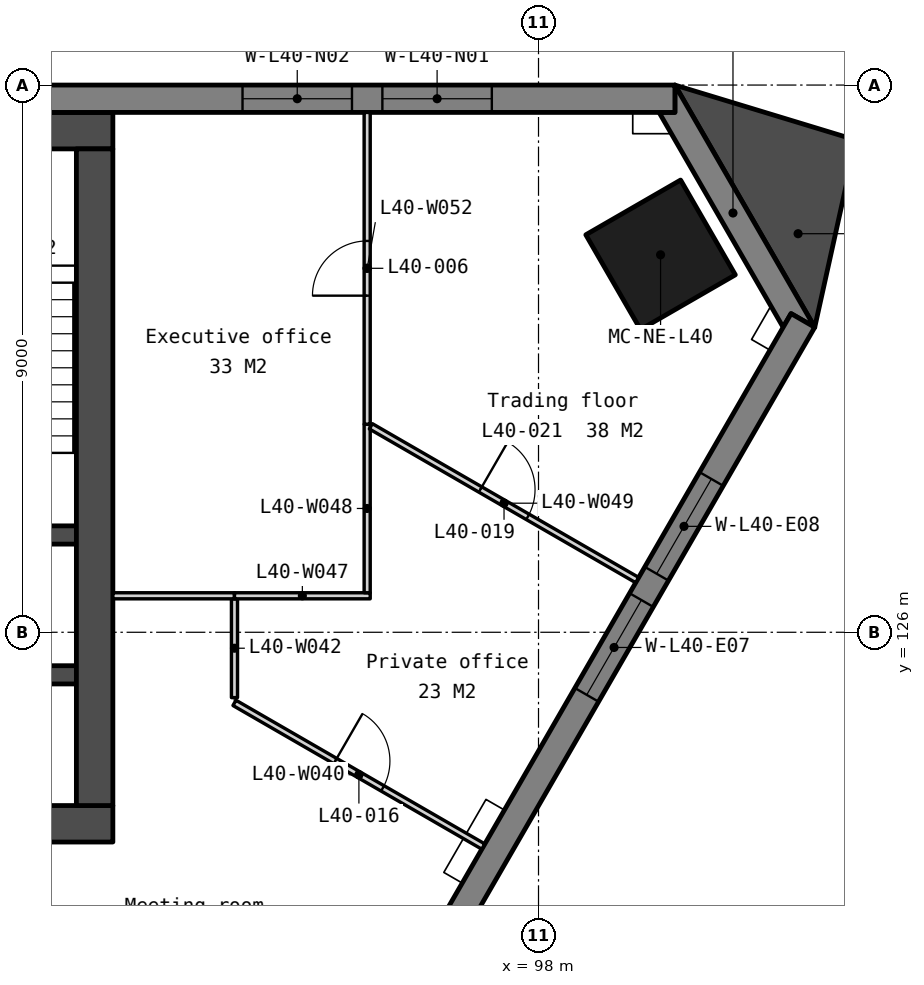
"""IFC4 building model, lengths in metres.
Left out: names, types, materials, properties, quantities, classifications, styles, units other than length and angle.
Written with IfcOpenShell. Run it as: python <this file> out.ifc"""

import sys

from ifc_helpers import new_model, si_unit, direction, frame, frame_2d, origin, origin_2d, place, context, subcontext, project, spatial, polyline, rectangle, outline, extrude, element, fill, save


model = new_model("IFC4")
c1 = context("Model", 3, precision=1e-05, world=origin(), true_north=direction((0.0, 1.0)))
c2 = subcontext(c1, "Body", "Model", "MODEL_VIEW")
j1 = project(units=[si_unit("LENGTHUNIT", "METRE"), si_unit("PLANEANGLEUNIT", "RADIAN")], contexts=[c1])
p1 = place(None, origin())
s1 = spatial("IfcSite", under=j1, at=p1, CompositionType="ELEMENT")
p2 = place(p1, origin())
s2 = spatial("IfcBuilding", under=s1, at=p2, CompositionType="ELEMENT")
p3 = place(p2, frame((0.0, 0.0, 159.8)))
s3 = spatial("IfcBuildingStorey", under=s2, at=p3, CompositionType="ELEMENT", Elevation=159.8)
p4 = place(p3, frame((100.007, 132.208, 0.0), z_axis=(0.0, 0.0, 1.0), x_axis=(-0.5, 0.866025403784, 0.0)))
e1 = element("IfcColumn", 1, at=p4, inside=s3, PredefinedType="COLUMN", context=c2, shape_type="SweptSolid", body=[
    extrude(rectangle(XDim=1.8, YDim=1.8, at=origin_2d()), origin(), (0.0, 0.0, 1.0), 3.9),
])
p5 = place(p3, frame((69.0, 134.25, 0.0), z_axis=(0.0, 0.0, 1.0), x_axis=(1.0, 0.0, 0.0)))
e2 = element("IfcWall", 2, at=p5, inside=s3, PredefinedType="SOLIDWALL", context=c2, shape_type="SweptSolid", body=[
    extrude(rectangle(XDim=22.0, YDim=0.6, at=frame_2d((11.0, 0.0))), origin(), (0.0, 0.0, 1.0), 3.75),
])
p6 = place(p3, frame((69.0, 122.85, 0.0), z_axis=(0.0, 0.0, 1.0), x_axis=(1.0, 0.0, 0.0)))
e3 = element("IfcWall", 3, at=p6, inside=s3, PredefinedType="SOLIDWALL", context=c2, shape_type="SweptSolid", body=[
    extrude(rectangle(XDim=22.0, YDim=0.6, at=frame_2d((11.0, 0.0))), origin(), (0.0, 0.0, 1.0), 3.75),
])
p7 = place(p6, frame((16.375, 0.0, 0.0)))
e4 = element("IfcOpeningElement", 4, at=p7, cuts=e3, PredefinedType="OPENING", context=c2, shape_type="SweptSolid", body=[
    extrude(rectangle(XDim=1.8, YDim=2.1, at=frame_2d((0.9, 1.05))), frame((0.0, 0.31, 0.0), z_axis=(0.0, -1.0, 0.0), x_axis=(1.0, 0.0, 0.0)), (0.0, 0.0, 1.0), 0.62),
])
p8 = place(p6, frame((3.825, 0.0, 0.0)))
e5 = element("IfcOpeningElement", 5, at=p8, cuts=e3, PredefinedType="OPENING", context=c2, shape_type="SweptSolid", body=[
    extrude(rectangle(XDim=1.8, YDim=2.1, at=frame_2d((0.9, 1.05))), frame((0.0, 0.31, 0.0), z_axis=(0.0, -1.0, 0.0), x_axis=(1.0, 0.0, 0.0)), (0.0, 0.0, 1.0), 0.62),
])
p9 = place(p6, frame((12.85, 0.0, 0.0)))
e6 = element("IfcOpeningElement", 6, at=p9, cuts=e3, PredefinedType="OPENING", context=c2, shape_type="SweptSolid", body=[
    extrude(rectangle(XDim=1.5, YDim=2.1, at=frame_2d((0.75, 1.05))), frame((0.0, 0.31, 0.0), z_axis=(0.0, -1.0, 0.0), x_axis=(1.0, 0.0, 0.0)), (0.0, 0.0, 1.0), 0.62),
])
for number, where, z_axis, x_axis in (
    (7, (87.85, 127.6, 0.0), (0.0, 0.0, 1.0), (1.0, 0.0, 0.0)),
    (8, (87.85, 125.3, 0.0), (0.0, 0.0, 1.0), (1.0, 0.0, 0.0)),
):
    element("IfcWall", number, at=place(p3, frame(where, z_axis=z_axis, x_axis=x_axis)), inside=s3, PredefinedType="SOLIDWALL", context=c2, shape_type="SweptSolid", body=[
        extrude(rectangle(XDim=2.55, YDim=0.3, at=frame_2d((1.275, 0.0))), origin(), (0.0, 0.0, 1.0), 3.75),
    ])
p10 = place(p3, frame((90.7, 133.95, 0.0), z_axis=(0.0, 0.0, 1.0), x_axis=(0.0, -1.0, 0.0)))
e9 = element("IfcWall", 9, at=p10, inside=s3, PredefinedType="SOLIDWALL", context=c2, shape_type="SweptSolid", body=[
    extrude(rectangle(XDim=10.8, YDim=0.6, at=frame_2d((5.4, 0.0))), origin(), (0.0, 0.0, 1.0), 3.75),
])
p11 = place(p3, frame((0.0, 0.0, -0.15)))
e10 = element("IfcWall", 10, at=p11, inside=s3, PredefinedType="SOLIDWALL", context=c2, shape_type="SweptSolid", body=[
    extrude(outline(polyline([(102.543, 131.016), (102.153, 131.241), (102.023, 131.016), (99.983, 134.55), (100.243, 134.55), (100.243, 135.0), (102.543, 131.016)])), origin(), (0.0, 0.0, 1.0), 3.9),
])
p12 = place(p3, frame((100.243, 134.775, -0.15), z_axis=(0.0, 0.0, 1.0), x_axis=(-1.0, 0.0, 0.0)))
e11 = element("IfcWall", 11, at=p12, inside=s3, PredefinedType="SOLIDWALL", context=c2, shape_type="SweptSolid", body=[
    extrude(outline(polyline([(40.486, 0.0), (40.486, 3.9), (0.0, 3.9), (0.0, 0.0), (40.486, 0.0)])), frame((0.0, 0.225, 0.0), z_axis=(0.0, -1.0, 0.0), x_axis=(1.0, 0.0, 0.0)), (0.0, 0.0, 1.0), 0.45),
])
p13 = place(p12, frame((3.011, 0.0, 0.95)))
e12 = element("IfcOpeningElement", 12, at=p13, cuts=e11, PredefinedType="OPENING", context=c2, shape_type="SweptSolid", body=[
    extrude(rectangle(XDim=1.8, YDim=2.2, at=frame_2d((0.9, 1.1))), frame((0.0, 0.235, 0.0), z_axis=(0.0, -1.0, 0.0), x_axis=(1.0, 0.0, 0.0)), (0.0, 0.0, 1.0), 0.47),
])
p14 = place(p12, frame((5.311, 0.0, 0.95)))
e13 = element("IfcOpeningElement", 13, at=p14, cuts=e11, PredefinedType="OPENING", context=c2, shape_type="SweptSolid", body=[
    extrude(rectangle(XDim=1.8, YDim=2.2, at=frame_2d((0.9, 1.1))), frame((0.0, 0.235, 0.0), z_axis=(0.0, -1.0, 0.0), x_axis=(1.0, 0.0, 0.0)), (0.0, 0.0, 1.0), 0.47),
])
p15 = place(p12, frame((13.132, 0.0, 0.95)))
e14 = element("IfcOpeningElement", 14, at=p15, cuts=e11, PredefinedType="OPENING", context=c2, shape_type="SweptSolid", body=[
    extrude(rectangle(XDim=1.8, YDim=2.2, at=frame_2d((0.9, 1.1))), frame((0.0, 0.235, 0.0), z_axis=(0.0, -1.0, 0.0), x_axis=(1.0, 0.0, 0.0)), (0.0, 0.0, 1.0), 0.47),
])
p16 = place(p12, frame((15.432, 0.0, 0.95)))
e15 = element("IfcOpeningElement", 15, at=p16, cuts=e11, PredefinedType="OPENING", context=c2, shape_type="SweptSolid", body=[
    extrude(rectangle(XDim=1.8, YDim=2.2, at=frame_2d((0.9, 1.1))), frame((0.0, 0.235, 0.0), z_axis=(0.0, -1.0, 0.0), x_axis=(1.0, 0.0, 0.0)), (0.0, 0.0, 1.0), 0.47),
])
p17 = place(p12, frame((23.254, 0.0, 0.95)))
e16 = element("IfcOpeningElement", 16, at=p17, cuts=e11, PredefinedType="OPENING", context=c2, shape_type="SweptSolid", body=[
    extrude(rectangle(XDim=1.8, YDim=2.2, at=frame_2d((0.9, 1.1))), frame((0.0, 0.235, 0.0), z_axis=(0.0, -1.0, 0.0), x_axis=(1.0, 0.0, 0.0)), (0.0, 0.0, 1.0), 0.47),
])
p18 = place(p12, frame((25.554, 0.0, 0.95)))
e17 = element("IfcOpeningElement", 17, at=p18, cuts=e11, PredefinedType="OPENING", context=c2, shape_type="SweptSolid", body=[
    extrude(rectangle(XDim=1.8, YDim=2.2, at=frame_2d((0.9, 1.1))), frame((0.0, 0.235, 0.0), z_axis=(0.0, -1.0, 0.0), x_axis=(1.0, 0.0, 0.0)), (0.0, 0.0, 1.0), 0.47),
])
p19 = place(p12, frame((33.375, 0.0, 0.95)))
e18 = element("IfcOpeningElement", 18, at=p19, cuts=e11, PredefinedType="OPENING", context=c2, shape_type="SweptSolid", body=[
    extrude(rectangle(XDim=1.8, YDim=2.2, at=frame_2d((0.9, 1.1))), frame((0.0, 0.235, 0.0), z_axis=(0.0, -1.0, 0.0), x_axis=(1.0, 0.0, 0.0)), (0.0, 0.0, 1.0), 0.47),
])
p20 = place(p12, frame((35.675, 0.0, 0.95)))
e19 = element("IfcOpeningElement", 19, at=p20, cuts=e11, PredefinedType="OPENING", context=c2, shape_type="SweptSolid", body=[
    extrude(rectangle(XDim=1.8, YDim=2.2, at=frame_2d((0.9, 1.1))), frame((0.0, 0.235, 0.0), z_axis=(0.0, -1.0, 0.0), x_axis=(1.0, 0.0, 0.0)), (0.0, 0.0, 1.0), 0.47),
])
p21 = place(p3, frame((82.105, 96.067, -0.15), z_axis=(0.0, 0.0, 1.0), x_axis=(0.499997369791, 0.866026922331, 0.0)))
e20 = element("IfcWall", 20, at=p21, inside=s3, PredefinedType="SOLIDWALL", context=c2, shape_type="SweptSolid", body=[
    extrude(outline(polyline([(40.486, 0.0), (40.486, 3.9), (0.0, 3.9), (0.0, 0.0), (40.486, 0.0)])), frame((0.0, 0.225, 0.0), z_axis=(0.0, -1.0, 0.0), x_axis=(1.0, 0.0, 0.0)), (0.0, 0.0, 1.0), 0.45),
])
p22 = place(p21, frame((3.011, 0.0, 0.95)))
e21 = element("IfcOpeningElement", 21, at=p22, cuts=e20, PredefinedType="OPENING", context=c2, shape_type="SweptSolid", body=[
    extrude(rectangle(XDim=1.8, YDim=2.2, at=frame_2d((0.9, 1.1))), frame((0.0, 0.235, 0.0), z_axis=(0.0, -1.0, 0.0), x_axis=(1.0, 0.0, 0.0)), (0.0, 0.0, 1.0), 0.47),
])
p23 = place(p21, frame((5.311, 0.0, 0.95)))
e22 = element("IfcOpeningElement", 22, at=p23, cuts=e20, PredefinedType="OPENING", context=c2, shape_type="SweptSolid", body=[
    extrude(rectangle(XDim=1.8, YDim=2.2, at=frame_2d((0.9, 1.1))), frame((0.0, 0.235, 0.0), z_axis=(0.0, -1.0, 0.0), x_axis=(1.0, 0.0, 0.0)), (0.0, 0.0, 1.0), 0.47),
])
p24 = place(p21, frame((13.132, 0.0, 0.95)))
e23 = element("IfcOpeningElement", 23, at=p24, cuts=e20, PredefinedType="OPENING", context=c2, shape_type="SweptSolid", body=[
    extrude(rectangle(XDim=1.8, YDim=2.2, at=frame_2d((0.9, 1.1))), frame((0.0, 0.235, 0.0), z_axis=(0.0, -1.0, 0.0), x_axis=(1.0, 0.0, 0.0)), (0.0, 0.0, 1.0), 0.47),
])
p25 = place(p21, frame((15.432, 0.0, 0.95)))
e24 = element("IfcOpeningElement", 24, at=p25, cuts=e20, PredefinedType="OPENING", context=c2, shape_type="SweptSolid", body=[
    extrude(rectangle(XDim=1.8, YDim=2.2, at=frame_2d((0.9, 1.1))), frame((0.0, 0.235, 0.0), z_axis=(0.0, -1.0, 0.0), x_axis=(1.0, 0.0, 0.0)), (0.0, 0.0, 1.0), 0.47),
])
p26 = place(p21, frame((23.254, 0.0, 0.95)))
e25 = element("IfcOpeningElement", 25, at=p26, cuts=e20, PredefinedType="OPENING", context=c2, shape_type="SweptSolid", body=[
    extrude(rectangle(XDim=1.8, YDim=2.2, at=frame_2d((0.9, 1.1))), frame((0.0, 0.235, 0.0), z_axis=(0.0, -1.0, 0.0), x_axis=(1.0, 0.0, 0.0)), (0.0, 0.0, 1.0), 0.47),
])
p27 = place(p21, frame((25.554, 0.0, 0.95)))
e26 = element("IfcOpeningElement", 26, at=p27, cuts=e20, PredefinedType="OPENING", context=c2, shape_type="SweptSolid", body=[
    extrude(rectangle(XDim=1.8, YDim=2.2, at=frame_2d((0.9, 1.1))), frame((0.0, 0.235, 0.0), z_axis=(0.0, -1.0, 0.0), x_axis=(1.0, 0.0, 0.0)), (0.0, 0.0, 1.0), 0.47),
])
p28 = place(p21, frame((33.375, 0.0, 0.95)))
e27 = element("IfcOpeningElement", 27, at=p28, cuts=e20, PredefinedType="OPENING", context=c2, shape_type="SweptSolid", body=[
    extrude(rectangle(XDim=1.8, YDim=2.2, at=frame_2d((0.9, 1.1))), frame((0.0, 0.235, 0.0), z_axis=(0.0, -1.0, 0.0), x_axis=(1.0, 0.0, 0.0)), (0.0, 0.0, 1.0), 0.47),
])
p29 = place(p21, frame((35.675, 0.0, 0.95)))
e28 = element("IfcOpeningElement", 28, at=p29, cuts=e20, PredefinedType="OPENING", context=c2, shape_type="SweptSolid", body=[
    extrude(rectangle(XDim=1.8, YDim=2.2, at=frame_2d((0.9, 1.1))), frame((0.0, 0.235, 0.0), z_axis=(0.0, -1.0, 0.0), x_axis=(1.0, 0.0, 0.0)), (0.0, 0.0, 1.0), 0.47),
])
p30 = place(p3, frame((0.0, 0.0, -0.15)))
e29 = element("IfcWall", 29, at=p30, inside=s3, PredefinedType="SOLIDWALL", context=c2, shape_type="SweptSolid", body=[
    extrude(outline(polyline([(102.543, 131.016), (103.224, 134.094), (100.243, 135.0), (102.543, 131.016)])), origin(), (0.0, 0.0, 1.0), 3.9),
])
p31 = place(p3, frame((93.0, 124.839, 0.0), z_axis=(0.0, 0.0, 1.0), x_axis=(0.866028145587, -0.499995251029, 0.0)))
e30 = element("IfcWall", 30, at=p31, inside=s3, PredefinedType="PARTITIONING", context=c2, shape_type="SweptSolid", body=[
    extrude(rectangle(XDim=4.726, YDim=0.1, at=frame_2d((2.363, 0.0))), origin(), (0.0, 0.0, 1.0), 3.75),
])
p32 = place(p31, frame((1.913, 0.0, 0.0)))
e31 = element("IfcOpeningElement", 31, at=p32, cuts=e30, PredefinedType="OPENING", context=c2, shape_type="SweptSolid", body=[
    extrude(rectangle(XDim=0.9, YDim=2.1, at=frame_2d((0.45, 1.05))), frame((0.0, 0.06, 0.0), z_axis=(0.0, -1.0, 0.0), x_axis=(1.0, 0.0, 0.0)), (0.0, 0.0, 1.0), 0.12),
])
p33 = place(p3, frame((93.0, 124.925, 0.0), z_axis=(0.0, 0.0, 1.0), x_axis=(0.0, 1.0, 0.0)))
e32 = element("IfcWall", 32, at=p33, inside=s3, PredefinedType="PARTITIONING", context=c2, shape_type="SweptSolid", body=[
    extrude(rectangle(XDim=1.625, YDim=0.1, at=frame_2d((0.812, 0.0))), origin(), (0.0, 0.0, 1.0), 3.75),
])
p34 = place(p3, frame((91.0, 126.6, 0.0), z_axis=(0.0, 0.0, 1.0), x_axis=(1.0, 0.0, 0.0)))
e33 = element("IfcWall", 33, at=p34, inside=s3, PredefinedType="PARTITIONING", context=c2, shape_type="SweptSolid", body=[
    extrude(rectangle(XDim=2.0, YDim=0.1, at=frame_2d((1.0, 0.0))), origin(), (0.0, 0.0, 1.0), 3.75),
])
p35 = place(p3, frame((93.0, 126.6, 0.0), z_axis=(0.0, 0.0, 1.0), x_axis=(1.0, 0.0, 0.0)))
e34 = element("IfcWall", 34, at=p35, inside=s3, PredefinedType="PARTITIONING", context=c2, shape_type="SweptSolid", body=[
    extrude(rectangle(XDim=2.232, YDim=0.1, at=frame_2d((1.116, 0.0))), origin(), (0.0, 0.0, 1.0), 3.75),
])
p36 = place(p3, frame((95.182, 126.65, 0.0), z_axis=(0.0, 0.0, 1.0), x_axis=(0.0, 1.0, 0.0)))
e35 = element("IfcWall", 35, at=p36, inside=s3, PredefinedType="PARTITIONING", context=c2, shape_type="SweptSolid", body=[
    extrude(rectangle(XDim=2.772, YDim=0.1, at=frame_2d((1.386, 0.0))), origin(), (0.0, 0.0, 1.0), 3.75),
])
p37 = place(p3, frame((95.243, 129.387, 0.0), z_axis=(0.0, 0.0, 1.0), x_axis=(0.866030444867, -0.499991268487, 0.0)))
e36 = element("IfcWall", 36, at=p37, inside=s3, PredefinedType="PARTITIONING", context=c2, shape_type="SweptSolid", body=[
    extrude(rectangle(XDim=5.058, YDim=0.1, at=frame_2d((2.529, 0.0))), origin(), (0.0, 0.0, 1.0), 3.75),
])
p38 = place(p37, frame((2.079, 0.0, 0.0)))
e37 = element("IfcOpeningElement", 37, at=p38, cuts=e36, PredefinedType="OPENING", context=c2, shape_type="SweptSolid", body=[
    extrude(rectangle(XDim=0.9, YDim=2.1, at=frame_2d((0.45, 1.05))), frame((0.0, 0.06, 0.0), z_axis=(0.0, -1.0, 0.0), x_axis=(1.0, 0.0, 0.0)), (0.0, 0.0, 1.0), 0.12),
])
p39 = place(p3, frame((95.182, 129.422, 0.0), z_axis=(0.0, 0.0, 1.0), x_axis=(0.0, 1.0, 0.0)))
e38 = element("IfcWall", 38, at=p39, inside=s3, PredefinedType="PARTITIONING", context=c2, shape_type="SweptSolid", body=[
    extrude(rectangle(XDim=5.128, YDim=0.1, at=frame_2d((2.564, 0.0))), origin(), (0.0, 0.0, 1.0), 3.75),
])
p40 = place(p39, frame((2.114, 0.0, 0.0)))
e39 = element("IfcOpeningElement", 39, at=p40, cuts=e38, PredefinedType="OPENING", context=c2, shape_type="SweptSolid", body=[
    extrude(rectangle(XDim=0.9, YDim=2.1, at=frame_2d((0.45, 1.05))), frame((0.0, 0.06, 0.0), z_axis=(0.0, -1.0, 0.0), x_axis=(1.0, 0.0, 0.0)), (0.0, 0.0, 1.0), 0.12),
])
p41 = place(p13, origin())
e40 = element("IfcWindow", 40, at=p41, inside=s3, PartitioningType="SINGLE_PANEL", PredefinedType="WINDOW", context=c2, shape_type="SweptSolid", body=[
    extrude(rectangle(XDim=1.8, YDim=2.2, at=frame_2d((0.9, 1.1))), frame((0.0, 0.03, 0.0), z_axis=(0.0, -1.0, 0.0), x_axis=(1.0, 0.0, 0.0)), (0.0, 0.0, 1.0), 0.06),
])
fill(e12, e40)
p42 = place(p14, origin())
e41 = element("IfcWindow", 41, at=p42, inside=s3, PartitioningType="SINGLE_PANEL", PredefinedType="WINDOW", context=c2, shape_type="SweptSolid", body=[
    extrude(rectangle(XDim=1.8, YDim=2.2, at=frame_2d((0.9, 1.1))), frame((0.0, 0.03, 0.0), z_axis=(0.0, -1.0, 0.0), x_axis=(1.0, 0.0, 0.0)), (0.0, 0.0, 1.0), 0.06),
])
fill(e13, e41)
p43 = place(p28, origin())
e42 = element("IfcWindow", 42, at=p43, inside=s3, PartitioningType="SINGLE_PANEL", PredefinedType="WINDOW", context=c2, shape_type="SweptSolid", body=[
    extrude(rectangle(XDim=1.8, YDim=2.2, at=frame_2d((0.9, 1.1))), frame((0.0, 0.03, 0.0), z_axis=(0.0, -1.0, 0.0), x_axis=(1.0, 0.0, 0.0)), (0.0, 0.0, 1.0), 0.06),
])
fill(e27, e42)
p44 = place(p29, origin())
e43 = element("IfcWindow", 43, at=p44, inside=s3, PartitioningType="SINGLE_PANEL", PredefinedType="WINDOW", context=c2, shape_type="SweptSolid", body=[
    extrude(rectangle(XDim=1.8, YDim=2.2, at=frame_2d((0.9, 1.1))), frame((0.0, 0.03, 0.0), z_axis=(0.0, -1.0, 0.0), x_axis=(1.0, 0.0, 0.0)), (0.0, 0.0, 1.0), 0.06),
])
fill(e28, e43)
p45 = place(p40, origin())
e44 = element("IfcDoor", 44, at=p45, inside=s3, OperationType="SINGLE_SWING_LEFT", PredefinedType="DOOR", context=c2, shape_type="SweptSolid", body=[
    extrude(rectangle(XDim=0.9, YDim=2.1, at=frame_2d((0.45, 1.05))), frame((0.0, 0.025, 0.0), z_axis=(0.0, -1.0, 0.0), x_axis=(1.0, 0.0, 0.0)), (0.0, 0.0, 1.0), 0.05),
])
fill(e39, e44)
p46 = place(p32, origin())
e45 = element("IfcDoor", 45, at=p46, inside=s3, OperationType="SINGLE_SWING_LEFT", PredefinedType="DOOR", context=c2, shape_type="SweptSolid", body=[
    extrude(rectangle(XDim=0.9, YDim=2.1, at=frame_2d((0.45, 1.05))), frame((0.0, 0.025, 0.0), z_axis=(0.0, -1.0, 0.0), x_axis=(1.0, 0.0, 0.0)), (0.0, 0.0, 1.0), 0.05),
])
fill(e31, e45)
p47 = place(p38, origin())
e46 = element("IfcDoor", 46, at=p47, inside=s3, OperationType="SINGLE_SWING_LEFT", PredefinedType="DOOR", context=c2, shape_type="SweptSolid", body=[
    extrude(rectangle(XDim=0.9, YDim=2.1, at=frame_2d((0.45, 1.05))), frame((0.0, 0.025, 0.0), z_axis=(0.0, -1.0, 0.0), x_axis=(1.0, 0.0, 0.0)), (0.0, 0.0, 1.0), 0.05),
])
fill(e37, e46)
save(model, sys.argv[1])
